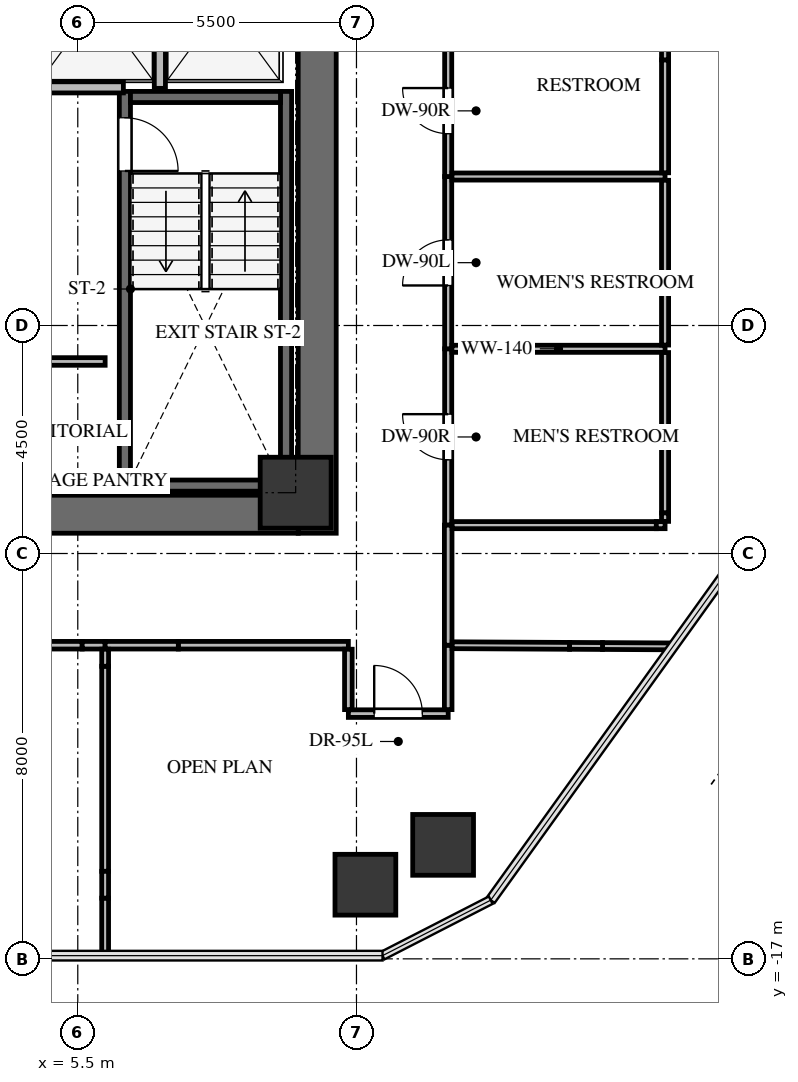
"""IFC4 building model, lengths in metres.
Left out: names, types, materials, properties, quantities, classifications, styles, units other than length and angle.
Written with IfcOpenShell. Run it as: python <this file> out.ifc"""

import sys

from ifc_helpers import new_model, si_unit, direction, frame, frame_2d, origin, origin_2d, place, context, subcontext, project, spatial, rectangle, extrude, source, transform, mapped, element, fill, save


model = new_model("IFC4")
c1 = context("Model", 3, precision=1e-05, world=origin(), true_north=direction((0.0, 1.0)))
c2 = subcontext(c1, "Body", "Model", "MODEL_VIEW")
j1 = project(units=[si_unit("LENGTHUNIT", "METRE"), si_unit("PLANEANGLEUNIT", "RADIAN")], contexts=[c1])
p1 = place(None, origin())
s1 = spatial("IfcSite", under=j1, at=p1, CompositionType="ELEMENT")
p2 = place(p1, origin())
s2 = spatial("IfcBuilding", under=s1, at=p2, CompositionType="ELEMENT")
p3 = place(p2, frame((0.0, 0.0, 140.1)))
s3 = spatial("IfcBuildingStorey", under=s2, at=p3, CompositionType="ELEMENT", Elevation=140.1)
p4 = place(p3, frame((10.225, -8.6, 0.0), z_axis=(0.0, 0.0, 1.0), x_axis=(0.0, 1.0, 0.0)))
e1 = element("IfcWall", 1, at=p4, inside=s3, PredefinedType="SHEAR", context=c2, shape_type="SweptSolid", body=[
    extrude(rectangle(XDim=17.2, YDim=0.75, at=frame_2d((8.6, 0.0))), origin(), (0.0, 0.0, 1.0), 3.0),
])
p5 = place(p3, frame((2.1, -8.225, 0.0), z_axis=(0.0, 0.0, 1.0), x_axis=(1.0, 0.0, 0.0)))
e2 = element("IfcWall", 2, at=p5, inside=s3, PredefinedType="SHEAR", context=c2, shape_type="SweptSolid", body=[
    extrude(rectangle(XDim=7.75, YDim=0.75, at=frame_2d((3.875, 0.0))), origin(), (0.0, 0.0, 1.0), 3.0),
])
p6 = place(p3, frame((9.61, -7.77, -0.24), z_axis=(0.0, 0.0, 1.0), x_axis=(0.0, 1.0, 0.0)))
e3 = element("IfcWall", 3, at=p6, inside=s3, PredefinedType="SHEAR", context=c2, shape_type="SweptSolid", body=[
    extrude(rectangle(XDim=7.89, YDim=0.22, at=frame_2d((3.945, 0.0))), origin(), (0.0, 0.0, 1.0), 3.0),
])
p7 = place(p3, frame((6.43, 0.12, -0.24), z_axis=(0.0, 0.0, 1.0), x_axis=(0.0, -1.0, 0.0)))
e4 = element("IfcWall", 4, at=p7, inside=s3, PredefinedType="SHEAR", context=c2, shape_type="SweptSolid", body=[
    extrude(rectangle(XDim=7.89, YDim=0.22, at=frame_2d((3.945, 0.0))), origin(), (0.0, 0.0, 1.0), 3.0),
])
p8 = place(p7, frame((0.52, 0.0, 0.0)))
e5 = element("IfcOpeningElement", 5, at=p8, cuts=e4, PredefinedType="OPENING", context=c2, shape_type="SweptSolid", body=[
    extrude(rectangle(XDim=1.05, YDim=2.15, at=frame_2d((0.525, 1.075))), frame((0.0, 0.12, 0.0), z_axis=(0.0, -1.0, 0.0), x_axis=(1.0, 0.0, 0.0)), (0.0, 0.0, 1.0), 0.24),
])
for number, where, z_axis, x_axis in (
    (6, (6.54, -7.66, -0.24), (0.0, 0.0, 1.0), (1.0, 0.0, 0.0)),
    (7, (9.5, 0.01, -0.24), (0.0, 0.0, 1.0), (-1.0, 0.0, 0.0)),
):
    element("IfcWall", number, at=place(p3, frame(where, z_axis=z_axis, x_axis=x_axis)), inside=s3, PredefinedType="SHEAR", context=c2, shape_type="SweptSolid", body=[
        extrude(rectangle(XDim=2.96, YDim=0.22, at=frame_2d((1.48, 0.0))), origin(), (0.0, 0.0, 1.0), 3.0),
    ])
m1 = source(origin(), c2, "Body", "SweptSolid", [
    extrude(rectangle(XDim=1.4, YDim=1.4, at=origin_2d()), origin(), (0.0, 0.0, 1.0), 3.0),
])
p9 = place(p3, frame((9.8, -7.8, -0.24), z_axis=(0.0, 0.0, 1.0), x_axis=(1.0, 0.0, 0.0)))
e8 = element("IfcColumn", 8, at=p9, inside=s3, PredefinedType="COLUMN", context=c2, shape_type="MappedRepresentation", body=[
    mapped(m1, transform((0.0, 0.0, 0.0), x_axis=(1.0, 0.0, 0.0), y_axis=(0.0, 1.0, 0.0), z_axis=(0.0, 0.0, 1.0), scale=1.0)),
])
m2 = source(origin(), c2, "Body", "SweptSolid", [
    extrude(rectangle(XDim=1.2, YDim=1.2, at=origin_2d()), origin(), (0.0, 0.0, 1.0), 3.0),
])
for number, where, z_axis, x_axis in (
    (9, (12.71, -14.75, -0.24), (0.0, 0.0, 1.0), (1.0, 0.0, 0.0)),
    (10, (11.176, -15.537, -0.24), (0.0, 0.0, 1.0), (1.0, 0.0, 0.0)),
):
    element("IfcColumn", number, at=place(p3, frame(where, z_axis=z_axis, x_axis=x_axis)), inside=s3, PredefinedType="COLUMN", context=c2, shape_type="MappedRepresentation", body=[
        mapped(m2, transform((0.0, 0.0, 0.0), x_axis=(1.0, 0.0, 0.0), y_axis=(0.0, 1.0, 0.0), z_axis=(0.0, 0.0, 1.0), scale=1.0)),
    ])
p10 = place(p3, frame((7.12, 0.18, 0.0), z_axis=(0.0, 0.0, 1.0), x_axis=(0.0, 1.0, 0.0)))
e11 = element("IfcWall", 11, at=p10, inside=s3, PredefinedType="SOLIDWALL", context=c2, shape_type="SweptSolid", body=[
    extrude(rectangle(XDim=3.186, YDim=0.22, at=frame_2d((1.593, 0.0))), origin(), (0.0, 0.0, 1.0), 2.745),
])
p11 = place(p3, frame((4.734, 0.2, 0.0), z_axis=(0.0, 0.0, 1.0), x_axis=(1.0, 0.0, 0.0)))
e12 = element("IfcWall", 12, at=p11, inside=s3, PredefinedType="SOLIDWALL", context=c2, shape_type="SweptSolid", body=[
    extrude(rectangle(XDim=1.666, YDim=0.22, at=frame_2d((0.833, 0.0))), origin(), (0.0, 0.0, 1.0), 2.745),
])
p12 = place(p3, frame((2.51, -5.21, 0.0), z_axis=(0.0, 0.0, 1.0), x_axis=(1.0, 0.0, 0.0)))
e13 = element("IfcWall", 13, at=p12, inside=s3, PredefinedType="PARTITIONING", context=c2, shape_type="SweptSolid", body=[
    extrude(rectangle(XDim=3.53, YDim=0.15, at=frame_2d((1.765, 0.0))), origin(), (0.0, 0.0, 1.0), 2.745),
])
p13 = place(p12, frame((1.315, 0.0, 0.0)))
e14 = element("IfcOpeningElement", 14, at=p13, cuts=e13, PredefinedType="OPENING", context=c2, shape_type="SweptSolid", body=[
    extrude(rectangle(XDim=0.9, YDim=2.05, at=frame_2d((0.45, 1.025))), frame((0.0, 0.085, 0.0), z_axis=(0.0, -1.0, 0.0), x_axis=(1.0, 0.0, 0.0)), (0.0, 0.0, 1.0), 0.17),
])
p14 = place(p3, frame((12.81, -8.44, 0.0), z_axis=(0.0, 0.0, 1.0), x_axis=(0.0, 1.0, 0.0)))
e15 = element("IfcWall", 15, at=p14, inside=s3, PredefinedType="PARTITIONING", context=c2, shape_type="SweptSolid", body=[
    extrude(rectangle(XDim=3.48, YDim=0.14, at=frame_2d((1.74, 0.0))), origin(), (0.0, 0.0, 1.0), 2.745),
])
p15 = place(p14, frame((1.29, 0.0, 0.0)))
e16 = element("IfcOpeningElement", 16, at=p15, cuts=e15, PredefinedType="OPENING", context=c2, shape_type="SweptSolid", body=[
    extrude(rectangle(XDim=0.9, YDim=2.05, at=frame_2d((0.45, 1.025))), frame((0.0, 0.08, 0.0), z_axis=(0.0, -1.0, 0.0), x_axis=(1.0, 0.0, 0.0)), (0.0, 0.0, 1.0), 0.16),
])
p16 = place(p3, frame((12.81, -4.96, 0.0), z_axis=(0.0, 0.0, 1.0), x_axis=(0.0, 1.0, 0.0)))
e17 = element("IfcWall", 17, at=p16, inside=s3, PredefinedType="PARTITIONING", context=c2, shape_type="SweptSolid", body=[
    extrude(rectangle(XDim=3.4, YDim=0.14, at=frame_2d((1.7, 0.0))), origin(), (0.0, 0.0, 1.0), 2.745),
])
p17 = place(p16, frame((1.25, 0.0, 0.0)))
e18 = element("IfcOpeningElement", 18, at=p17, cuts=e17, PredefinedType="OPENING", context=c2, shape_type="SweptSolid", body=[
    extrude(rectangle(XDim=0.9, YDim=2.05, at=frame_2d((0.45, 1.025))), frame((0.0, 0.08, 0.0), z_axis=(0.0, -1.0, 0.0), x_axis=(1.0, 0.0, 0.0)), (0.0, 0.0, 1.0), 0.16),
])
p18 = place(p3, frame((12.81, -1.56, 0.0), z_axis=(0.0, 0.0, 1.0), x_axis=(0.0, 1.0, 0.0)))
e19 = element("IfcWall", 19, at=p18, inside=s3, PredefinedType="PARTITIONING", context=c2, shape_type="SweptSolid", body=[
    extrude(rectangle(XDim=2.592, YDim=0.14, at=frame_2d((1.296, 0.0))), origin(), (0.0, 0.0, 1.0), 2.745),
])
p19 = place(p18, frame((0.846, 0.0, 0.0)))
e20 = element("IfcOpeningElement", 20, at=p19, cuts=e19, PredefinedType="OPENING", context=c2, shape_type="SweptSolid", body=[
    extrude(rectangle(XDim=0.9, YDim=2.05, at=frame_2d((0.45, 1.025))), frame((0.0, 0.08, 0.0), z_axis=(0.0, -1.0, 0.0), x_axis=(1.0, 0.0, 0.0)), (0.0, 0.0, 1.0), 0.16),
])
p20 = place(p3, frame((-1.96, -10.81, 0.0), z_axis=(0.0, 0.0, 1.0), x_axis=(1.0, 0.0, 0.0)))
e21 = element("IfcWall", 21, at=p20, inside=s3, PredefinedType="PARTITIONING", context=c2, shape_type="SweptSolid", body=[
    extrude(rectangle(XDim=7.547, YDim=0.15, at=frame_2d((3.773, 0.0))), origin(), (0.0, 0.0, 1.0), 1.912),
])
p21 = place(p3, frame((5.587, -10.81, 0.0), z_axis=(0.0, 0.0, 1.0), x_axis=(1.0, 0.0, 0.0)))
e22 = element("IfcWall", 22, at=p21, inside=s3, PredefinedType="PARTITIONING", context=c2, shape_type="SweptSolid", body=[
    extrude(rectangle(XDim=0.453, YDim=0.15, at=frame_2d((0.227, 0.0))), origin(), (0.0, 0.0, 1.0), 1.912),
])
p22 = place(p3, frame((7.484, -10.81, 0.0), z_axis=(0.0, 0.0, 1.0), x_axis=(1.0, 0.0, 0.0)))
e23 = element("IfcWall", 23, at=p22, inside=s3, PredefinedType="PARTITIONING", context=c2, shape_type="SweptSolid", body=[
    extrude(rectangle(XDim=3.356, YDim=0.15, at=frame_2d((1.678, 0.0))), origin(), (0.0, 0.0, 1.0), 1.912),
])
p23 = place(p3, frame((6.04, -10.81, 0.0), z_axis=(0.0, 0.0, 1.0), x_axis=(1.0, 0.0, 0.0)))
e24 = element("IfcWall", 24, at=p23, inside=s3, PredefinedType="PARTITIONING", context=c2, shape_type="SweptSolid", body=[
    extrude(rectangle(XDim=1.444, YDim=0.15, at=frame_2d((0.722, 0.0))), origin(), (0.0, 0.0, 1.0), 1.912),
])
p24 = place(p3, frame((10.84, -12.16, 0.0), z_axis=(0.0, 0.0, 1.0), x_axis=(1.0, 0.0, 0.0)))
e25 = element("IfcWall", 25, at=p24, inside=s3, PredefinedType="PARTITIONING", context=c2, shape_type="SweptSolid", body=[
    extrude(rectangle(XDim=1.97, YDim=0.15, at=frame_2d((0.985, 0.0))), origin(), (0.0, 0.0, 1.0), 2.745),
])
p25 = place(p24, frame((0.51, 0.0, 0.0)))
e26 = element("IfcOpeningElement", 26, at=p25, cuts=e25, PredefinedType="OPENING", context=c2, shape_type="SweptSolid", body=[
    extrude(rectangle(XDim=0.95, YDim=2.1, at=frame_2d((0.475, 1.05))), frame((0.0, 0.085, 0.0), z_axis=(0.0, -1.0, 0.0), x_axis=(1.0, 0.0, 0.0)), (0.0, 0.0, 1.0), 0.17),
])
p26 = place(p3, frame((10.84, -10.889, 0.0), z_axis=(0.0, 0.0, 1.0), x_axis=(0.0, -1.0, 0.0)))
e27 = element("IfcWall", 27, at=p26, inside=s3, PredefinedType="PARTITIONING", context=c2, shape_type="SweptSolid", body=[
    extrude(rectangle(XDim=1.192, YDim=0.15, at=frame_2d((0.596, 0.0))), origin(), (0.0, 0.0, 1.0), 2.745),
])
p27 = place(p3, frame((12.81, -12.081, 0.0), z_axis=(0.0, 0.0, 1.0), x_axis=(0.0, 1.0, 0.0)))
e28 = element("IfcWall", 28, at=p27, inside=s3, PredefinedType="PARTITIONING", context=c2, shape_type="SweptSolid", body=[
    extrude(rectangle(XDim=1.271, YDim=0.15, at=frame_2d((0.635, 0.0))), origin(), (0.0, 0.0, 1.0), 2.745),
])
p28 = place(p3, frame((12.81, -10.81, 0.0), z_axis=(0.0, 0.0, 1.0), x_axis=(0.0, 1.0, 0.0)))
e29 = element("IfcWall", 29, at=p28, inside=s3, PredefinedType="PARTITIONING", context=c2, shape_type="SweptSolid", body=[
    extrude(rectangle(XDim=2.37, YDim=0.15, at=frame_2d((1.185, 0.0))), origin(), (0.0, 0.0, 1.0), 2.745),
])
p29 = place(p3, frame((12.884, -4.96, 0.0), z_axis=(0.0, 0.0, 1.0), x_axis=(1.0, 0.0, 0.0)))
e30 = element("IfcWall", 30, at=p29, inside=s3, PredefinedType="PARTITIONING", context=c2, shape_type="SweptSolid", body=[
    extrude(rectangle(XDim=4.206, YDim=0.14, at=frame_2d((2.103, 0.0))), origin(), (0.0, 0.0, 1.0), 2.745),
])
p30 = place(p3, frame((16.917, -8.44, 0.0), z_axis=(0.0, 0.0, 1.0), x_axis=(-1.0, 0.0, 0.0)))
e31 = element("IfcWall", 31, at=p30, inside=s3, PredefinedType="PARTITIONING", context=c2, shape_type="SweptSolid", body=[
    extrude(rectangle(XDim=4.029, YDim=0.14, at=frame_2d((2.014, 0.0))), origin(), (0.0, 0.0, 1.0), 2.745),
])
p31 = place(p3, frame((17.09, -8.44, 0.0), z_axis=(0.0, 0.0, 1.0), x_axis=(-1.0, 0.0, 0.0)))
e32 = element("IfcWall", 32, at=p31, inside=s3, PredefinedType="PARTITIONING", context=c2, shape_type="SweptSolid", body=[
    extrude(rectangle(XDim=0.173, YDim=0.14, at=frame_2d((0.086, 0.0))), origin(), (0.0, 0.0, 1.0), 2.08),
])
p32 = place(p3, frame((17.09, -5.034, 0.0), z_axis=(0.0, 0.0, 1.0), x_axis=(0.0, -1.0, 0.0)))
e33 = element("IfcWall", 33, at=p32, inside=s3, PredefinedType="PARTITIONING", context=c2, shape_type="SweptSolid", body=[
    extrude(rectangle(XDim=3.166, YDim=0.14, at=frame_2d((1.583, 0.0))), origin(), (0.0, 0.0, 1.0), 2.08),
])
p33 = place(p3, frame((17.09, -8.2, 0.0), z_axis=(0.0, 0.0, 1.0), x_axis=(0.0, -1.0, 0.0)))
e34 = element("IfcWall", 34, at=p33, inside=s3, PredefinedType="PARTITIONING", context=c2, shape_type="SweptSolid", body=[
    extrude(rectangle(XDim=0.166, YDim=0.14, at=frame_2d((0.083, 0.0))), origin(), (0.0, 0.0, 1.0), 2.08),
])
p34 = place(p3, frame((12.884, -1.56, 0.0), z_axis=(0.0, 0.0, 1.0), x_axis=(1.0, 0.0, 0.0)))
e35 = element("IfcWall", 35, at=p34, inside=s3, PredefinedType="PARTITIONING", context=c2, shape_type="SweptSolid", body=[
    extrude(rectangle(XDim=4.206, YDim=0.14, at=frame_2d((2.103, 0.0))), origin(), (0.0, 0.0, 1.0), 2.745),
])
p35 = place(p3, frame((17.09, -1.634, 0.0), z_axis=(0.0, 0.0, 1.0), x_axis=(0.0, -1.0, 0.0)))
e36 = element("IfcWall", 36, at=p35, inside=s3, PredefinedType="PARTITIONING", context=c2, shape_type="SweptSolid", body=[
    extrude(rectangle(XDim=3.252, YDim=0.14, at=frame_2d((1.626, 0.0))), origin(), (0.0, 0.0, 1.0), 2.745),
])
p36 = place(p3, frame((17.09, 0.743, 0.0), z_axis=(0.0, 0.0, 1.0), x_axis=(0.0, -1.0, 0.0)))
e37 = element("IfcWall", 37, at=p36, inside=s3, PredefinedType="PARTITIONING", context=c2, shape_type="SweptSolid", body=[
    extrude(rectangle(XDim=2.229, YDim=0.14, at=frame_2d((1.114, 0.0))), origin(), (0.0, 0.0, 1.0), 2.745),
])
p37 = place(p3, frame((17.09, 1.329, 0.0), z_axis=(0.0, 0.0, 1.0), x_axis=(0.0, -1.0, 0.0)))
e38 = element("IfcWall", 38, at=p37, inside=s3, PredefinedType="PARTITIONING", context=c2, shape_type="SweptSolid", body=[
    extrude(rectangle(XDim=0.586, YDim=0.14, at=frame_2d((0.293, 0.0))), origin(), (0.0, 0.0, 1.0), 1.912),
])
p38 = place(p3, frame((6.04, -11.225, 0.0), z_axis=(0.0, 0.0, 1.0), x_axis=(0.0, -1.0, 0.0)))
e39 = element("IfcWall", 39, at=p38, inside=s3, PredefinedType="PARTITIONING", context=c2, shape_type="SweptSolid", body=[
    extrude(rectangle(XDim=4.047, YDim=0.135, at=frame_2d((2.023, 0.0))), origin(), (0.0, 0.0, 1.0), 2.745),
])
p39 = place(p3, frame((6.04, -15.802, 0.0), z_axis=(0.0, 0.0, 1.0), x_axis=(0.0, -1.0, 0.0)))
e40 = element("IfcWall", 40, at=p39, inside=s3, PredefinedType="PARTITIONING", context=c2, shape_type="SweptSolid", body=[
    extrude(rectangle(XDim=1.135, YDim=0.135, at=frame_2d((0.568, 0.0))), origin(), (0.0, 0.0, 1.0), 2.745),
])
p40 = place(p3, frame((6.04, -10.889, 0.0), z_axis=(0.0, 0.0, 1.0), x_axis=(0.0, -1.0, 0.0)))
e41 = element("IfcWall", 41, at=p40, inside=s3, PredefinedType="PARTITIONING", context=c2, shape_type="SweptSolid", body=[
    extrude(rectangle(XDim=0.336, YDim=0.135, at=frame_2d((0.168, 0.0))), origin(), (0.0, 0.0, 1.0), 1.912),
])
p41 = place(p3, frame((6.04, -15.272, 0.0), z_axis=(0.0, 0.0, 1.0), x_axis=(0.0, -1.0, 0.0)))
e42 = element("IfcWall", 42, at=p41, inside=s3, PredefinedType="PARTITIONING", context=c2, shape_type="SweptSolid", body=[
    extrude(rectangle(XDim=0.529, YDim=0.135, at=frame_2d((0.265, 0.0))), origin(), (0.0, 0.0, 1.0), 2.08),
])
p42 = place(p3, frame((12.889, -10.81, 0.0), z_axis=(0.0, 0.0, 1.0), x_axis=(0.999986120669, -0.005268630773, 0.0)))
e43 = element("IfcWall", 43, at=p42, inside=s3, PredefinedType="PARTITIONING", context=c2, shape_type="SweptSolid", body=[
    extrude(rectangle(XDim=2.317, YDim=0.135, at=frame_2d((1.158, 0.0))), origin(), (0.0, 0.0, 1.0), 2.745),
])
p43 = place(p3, frame((15.855, -10.826, 0.0), z_axis=(0.0, 0.0, 1.0), x_axis=(0.999986174138, -0.005258472432, 0.0)))
e44 = element("IfcWall", 44, at=p43, inside=s3, PredefinedType="PARTITIONING", context=c2, shape_type="SweptSolid", body=[
    extrude(rectangle(XDim=1.393, YDim=0.135, at=frame_2d((0.696, 0.0))), origin(), (0.0, 0.0, 1.0), 2.745),
])
p44 = place(p3, frame((15.206, -10.823, 0.0), z_axis=(0.0, 0.0, 1.0), x_axis=(0.999986139453, -0.005265064292, 0.0)))
e45 = element("IfcWall", 45, at=p44, inside=s3, PredefinedType="PARTITIONING", context=c2, shape_type="SweptSolid", body=[
    extrude(rectangle(XDim=0.649, YDim=0.135, at=frame_2d((0.325, 0.0))), origin(), (0.0, 0.0, 1.0), 2.08),
])
m3 = source(origin(), c2, "Body", "SweptSolid", [
    extrude(rectangle(XDim=1.05, YDim=2.15, at=frame_2d((0.525, 1.075))), frame((0.0, 0.025, 0.0), z_axis=(0.0, -1.0, 0.0), x_axis=(1.0, 0.0, 0.0)), (0.0, 0.0, 1.0), 0.05),
])
p45 = place(p8, origin())
e46 = element("IfcDoor", 46, at=p45, inside=s3, OperationType="SINGLE_SWING_RIGHT", PredefinedType="DOOR", context=c2, shape_type="MappedRepresentation", body=[
    mapped(m3, transform((0.0, 0.0, 0.0), x_axis=(1.0, 0.0, 0.0), y_axis=(0.0, 1.0, 0.0), z_axis=(0.0, 0.0, 1.0), scale=1.0)),
])
fill(e5, e46)
m4 = source(origin(), c2, "Body", "SweptSolid", [
    extrude(rectangle(XDim=0.9, YDim=2.05, at=frame_2d((0.45, 1.025))), frame((0.0, 0.025, 0.0), z_axis=(0.0, -1.0, 0.0), x_axis=(1.0, 0.0, 0.0)), (0.0, 0.0, 1.0), 0.05),
])
p46 = place(p15, origin())
e47 = element("IfcDoor", 47, at=p46, inside=s3, OperationType="SINGLE_SWING_RIGHT", PredefinedType="DOOR", context=c2, shape_type="MappedRepresentation", body=[
    mapped(m4, transform((0.0, 0.0, 0.0), x_axis=(1.0, 0.0, 0.0), y_axis=(0.0, 1.0, 0.0), z_axis=(0.0, 0.0, 1.0), scale=1.0)),
])
fill(e16, e47)
m5 = source(origin(), c2, "Body", "SweptSolid", [
    extrude(rectangle(XDim=0.9, YDim=2.05, at=frame_2d((0.45, 1.025))), frame((0.0, 0.025, 0.0), z_axis=(0.0, -1.0, 0.0), x_axis=(1.0, 0.0, 0.0)), (0.0, 0.0, 1.0), 0.05),
])
p47 = place(p17, origin())
e48 = element("IfcDoor", 48, at=p47, inside=s3, OperationType="SINGLE_SWING_LEFT", PredefinedType="DOOR", context=c2, shape_type="MappedRepresentation", body=[
    mapped(m5, transform((0.0, 0.0, 0.0), x_axis=(1.0, 0.0, 0.0), y_axis=(0.0, 1.0, 0.0), z_axis=(0.0, 0.0, 1.0), scale=1.0)),
])
fill(e18, e48)
p48 = place(p19, origin())
e49 = element("IfcDoor", 49, at=p48, inside=s3, OperationType="SINGLE_SWING_RIGHT", PredefinedType="DOOR", context=c2, shape_type="MappedRepresentation", body=[
    mapped(m4, transform((0.0, 0.0, 0.0), x_axis=(1.0, 0.0, 0.0), y_axis=(0.0, 1.0, 0.0), z_axis=(0.0, 0.0, 1.0), scale=1.0)),
])
fill(e20, e49)
m6 = source(origin(), c2, "Body", "SweptSolid", [
    extrude(rectangle(XDim=0.95, YDim=2.1, at=frame_2d((0.475, 1.05))), frame((0.0, 0.025, 0.0), z_axis=(0.0, -1.0, 0.0), x_axis=(1.0, 0.0, 0.0)), (0.0, 0.0, 1.0), 0.05),
])
p49 = place(p25, origin())
e50 = element("IfcDoor", 50, at=p49, inside=s3, OperationType="SINGLE_SWING_LEFT", PredefinedType="DOOR", context=c2, shape_type="MappedRepresentation", body=[
    mapped(m6, transform((0.0, 0.0, 0.0), x_axis=(1.0, 0.0, 0.0), y_axis=(0.0, 1.0, 0.0), z_axis=(0.0, 0.0, 1.0), scale=1.0)),
])
fill(e26, e50)
save(model, sys.argv[1])
